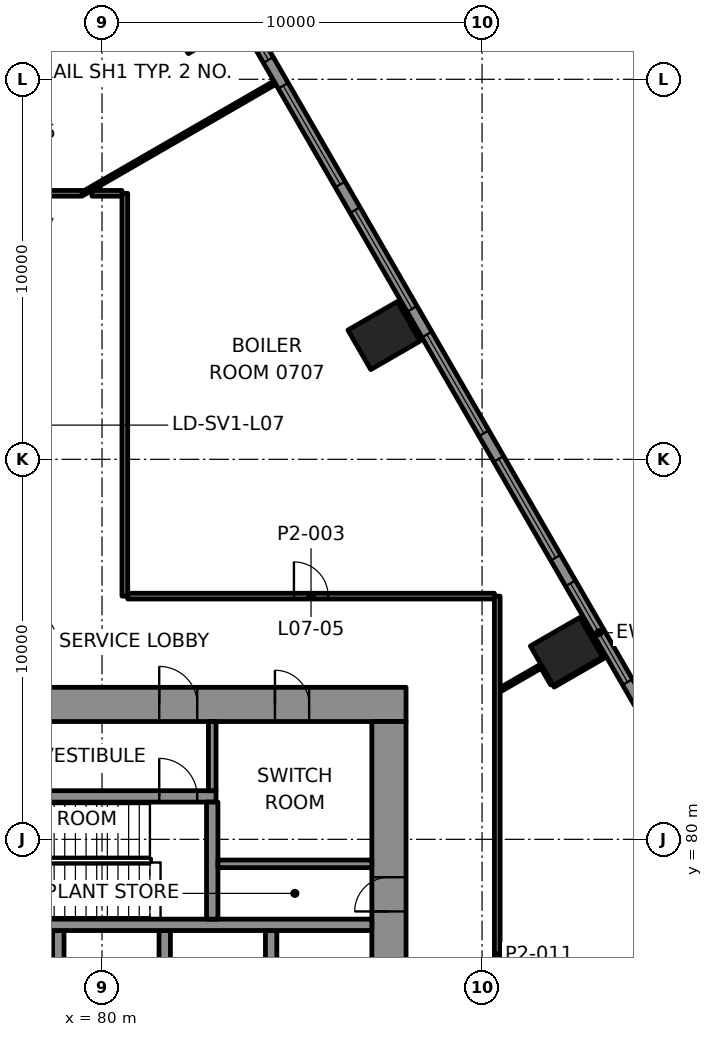
"""IFC4 building model, lengths in metres.
Left out: names, types, materials, properties, quantities, classifications, styles, units other than length and angle.
Written with IfcOpenShell. Run it as: python <this file> out.ifc"""

import sys

from ifc_helpers import new_model, si_unit, direction, frame, frame_2d, origin, origin_2d, place, context, subcontext, project, spatial, rectangle, extrude, element, fill, save


model = new_model("IFC4")
c1 = context("Model", 3, precision=1e-05, world=origin(), true_north=direction((0.0, 1.0)))
c2 = subcontext(c1, "Body", "Model", "MODEL_VIEW")
j1 = project(units=[si_unit("LENGTHUNIT", "METRE"), si_unit("PLANEANGLEUNIT", "RADIAN")], contexts=[c1])
p1 = place(None, origin())
s1 = spatial("IfcSite", under=j1, at=p1, CompositionType="ELEMENT")
p2 = place(p1, origin())
s2 = spatial("IfcBuilding", under=s1, at=p2, CompositionType="ELEMENT")
p3 = place(p2, frame((0.0, 0.0, 35.5)))
s3 = spatial("IfcBuildingStorey", under=s2, at=p3, CompositionType="ELEMENT", Elevation=35.5)
for number, where, z_axis, x_axis in (
    (1, (92.22, 84.942, -0.0), (0.0, 0.0, 1.0), (-0.5, 0.866, 0.0)),
    (2, (87.421, 93.256, -0.0), (0.0, 0.0, 1.0), (-0.5, 0.866, 0.0)),
    (3, (82.621, 101.57, -0.0), (0.0, 0.0, 1.0), (-0.5, 0.866, 0.0)),
):
    element("IfcColumn", number, at=place(p3, frame(where, z_axis=z_axis, x_axis=x_axis)), inside=s3, PredefinedType="COLUMN", context=c2, shape_type="SweptSolid", body=[
        extrude(rectangle(XDim=1.2, YDim=1.5, at=origin_2d()), origin(), (0.0, 0.0, 1.0), 4.5),
    ])
p4 = place(p3, frame((62.0, 83.55, 0.0), z_axis=(0.0, 0.0, 1.0), x_axis=(1.0, 0.0, 0.0)))
e4 = element("IfcWall", 4, at=p4, inside=s3, PredefinedType="SHEAR", context=c2, shape_type="SweptSolid", body=[
    extrude(rectangle(XDim=26.0, YDim=0.9, at=frame_2d((13.0, 0.0))), origin(), (0.0, 0.0, 1.0), 4.3),
])
p5 = place(p4, frame((5.695, 0.0, 0.0)))
e5 = element("IfcOpeningElement", 5, at=p5, cuts=e4, PredefinedType="OPENING", context=c2, shape_type="SweptSolid", body=[
    extrude(rectangle(XDim=1.0, YDim=2.1, at=frame_2d((0.5, 1.05))), frame((0.0, 0.46, 0.0), z_axis=(0.0, -1.0, 0.0), x_axis=(1.0, 0.0, 0.0)), (0.0, 0.0, 1.0), 0.92),
])
p6 = place(p4, frame((19.505, 0.0, 0.0)))
e6 = element("IfcOpeningElement", 6, at=p6, cuts=e4, PredefinedType="OPENING", context=c2, shape_type="SweptSolid", body=[
    extrude(rectangle(XDim=1.0, YDim=2.1, at=frame_2d((0.5, 1.05))), frame((0.0, 0.46, 0.0), z_axis=(0.0, -1.0, 0.0), x_axis=(1.0, 0.0, 0.0)), (0.0, 0.0, 1.0), 0.92),
])
p7 = place(p4, frame((3.45, 0.0, 0.0)))
e7 = element("IfcOpeningElement", 7, at=p7, cuts=e4, PredefinedType="OPENING", context=c2, shape_type="SweptSolid", body=[
    extrude(rectangle(XDim=0.9, YDim=2.1, at=frame_2d((0.45, 1.05))), frame((0.0, 0.46, 0.0), z_axis=(0.0, -1.0, 0.0), x_axis=(1.0, 0.0, 0.0)), (0.0, 0.0, 1.0), 0.92),
])
p8 = place(p4, frame((12.65, 0.0, 0.0)))
e8 = element("IfcOpeningElement", 8, at=p8, cuts=e4, PredefinedType="OPENING", context=c2, shape_type="SweptSolid", body=[
    extrude(rectangle(XDim=0.9, YDim=2.1, at=frame_2d((0.45, 1.05))), frame((0.0, 0.46, 0.0), z_axis=(0.0, -1.0, 0.0), x_axis=(1.0, 0.0, 0.0)), (0.0, 0.0, 1.0), 0.92),
])
p9 = place(p4, frame((22.55, 0.0, 0.0)))
e9 = element("IfcOpeningElement", 9, at=p9, cuts=e4, PredefinedType="OPENING", context=c2, shape_type="SweptSolid", body=[
    extrude(rectangle(XDim=0.9, YDim=2.1, at=frame_2d((0.45, 1.05))), frame((0.0, 0.46, 0.0), z_axis=(0.0, -1.0, 0.0), x_axis=(1.0, 0.0, 0.0)), (0.0, 0.0, 1.0), 0.92),
])
p10 = place(p3, frame((87.55, 66.9, 0.0), z_axis=(0.0, 0.0, 1.0), x_axis=(0.0, 1.0, 0.0)))
e10 = element("IfcWall", 10, at=p10, inside=s3, PredefinedType="SHEAR", context=c2, shape_type="SweptSolid", body=[
    extrude(rectangle(XDim=16.2, YDim=0.9, at=frame_2d((8.1, 0.0))), origin(), (0.0, 0.0, 1.0), 4.3),
])
p11 = place(p10, frame((5.5, 0.0, 0.0)))
e11 = element("IfcOpeningElement", 11, at=p11, cuts=e10, PredefinedType="OPENING", context=c2, shape_type="SweptSolid", body=[
    extrude(rectangle(XDim=1.8, YDim=2.1, at=frame_2d((0.9, 1.05))), frame((0.0, 0.46, 0.0), z_axis=(0.0, -1.0, 0.0), x_axis=(1.0, 0.0, 0.0)), (0.0, 0.0, 1.0), 0.92),
])
p12 = place(p10, frame((11.202, 0.0, 0.0)))
e12 = element("IfcOpeningElement", 12, at=p12, cuts=e10, PredefinedType="OPENING", context=c2, shape_type="SweptSolid", body=[
    extrude(rectangle(XDim=0.9, YDim=2.1, at=frame_2d((0.45, 1.05))), frame((0.0, 0.46, 0.0), z_axis=(0.0, -1.0, 0.0), x_axis=(1.0, 0.0, 0.0)), (0.0, 0.0, 1.0), 0.92),
])
for number, where, z_axis, x_axis in (
    (13, (78.85, 75.0, 0.0), (0.0, 0.0, 1.0), (0.0, 1.0, 0.0)),
    (14, (81.65, 75.0, 0.0), (0.0, 0.0, 1.0), (0.0, 1.0, 0.0)),
    (15, (84.45, 75.0, 0.0), (0.0, 0.0, 1.0), (0.0, 1.0, 0.0)),
):
    element("IfcWall", number, at=place(p3, frame(where, z_axis=z_axis, x_axis=x_axis)), inside=s3, PredefinedType="SHEAR", context=c2, shape_type="SweptSolid", body=[
        extrude(rectangle(XDim=2.6, YDim=0.3, at=frame_2d((1.3, 0.0))), origin(), (0.0, 0.0, 1.0), 4.3),
    ])
p13 = place(p3, frame((64.35, 77.75, 0.0), z_axis=(0.0, 0.0, 1.0), x_axis=(1.0, 0.0, 0.0)))
e16 = element("IfcWall", 16, at=p13, inside=s3, PredefinedType="SHEAR", context=c2, shape_type="SweptSolid", body=[
    extrude(rectangle(XDim=22.75, YDim=0.3, at=frame_2d((11.375, 0.0))), origin(), (0.0, 0.0, 1.0), 4.3),
])
p14 = place(p13, frame((3.345, 0.0, 0.0)))
e17 = element("IfcOpeningElement", 17, at=p14, cuts=e16, PredefinedType="OPENING", context=c2, shape_type="SweptSolid", body=[
    extrude(rectangle(XDim=1.0, YDim=2.1, at=frame_2d((0.5, 1.05))), frame((0.0, 0.16, 0.0), z_axis=(0.0, -1.0, 0.0), x_axis=(1.0, 0.0, 0.0)), (0.0, 0.0, 1.0), 0.32),
])
p15 = place(p3, frame((76.14, 81.13, 0.0), z_axis=(0.0, 0.0, 1.0), x_axis=(1.0, 0.0, 0.0)))
e18 = element("IfcWall", 18, at=p15, inside=s3, PredefinedType="SHEAR", context=c2, shape_type="SweptSolid", body=[
    extrude(rectangle(XDim=6.86, YDim=0.3, at=frame_2d((3.43, 0.0))), origin(), (0.0, 0.0, 1.0), 4.3),
])
p16 = place(p15, frame((5.365, 0.0, 0.0)))
e19 = element("IfcOpeningElement", 19, at=p16, cuts=e18, PredefinedType="OPENING", context=c2, shape_type="SweptSolid", body=[
    extrude(rectangle(XDim=1.0, YDim=2.1, at=frame_2d((0.5, 1.05))), frame((0.0, 0.16, 0.0), z_axis=(0.0, -1.0, 0.0), x_axis=(1.0, 0.0, 0.0)), (0.0, 0.0, 1.0), 0.32),
])
p17 = place(p3, frame((82.9, 77.9, 0.0), z_axis=(0.0, 0.0, 1.0), x_axis=(0.0, 1.0, 0.0)))
e20 = element("IfcWall", 20, at=p17, inside=s3, PredefinedType="SHEAR", context=c2, shape_type="SweptSolid", body=[
    extrude(rectangle(XDim=3.08, YDim=0.3, at=frame_2d((1.54, 0.0))), origin(), (0.0, 0.0, 1.0), 4.3),
])
p18 = place(p3, frame((80.675, 86.4, 0.0), z_axis=(0.0, 0.0, 1.0), x_axis=(1.0, 0.0, 0.0)))
e21 = element("IfcWall", 21, at=p18, inside=s3, PredefinedType="PARTITIONING", context=c2, shape_type="SweptSolid", body=[
    extrude(rectangle(XDim=9.649, YDim=0.15, at=frame_2d((4.825, 0.0))), origin(), (0.0, 0.0, 1.0), 3.7),
])
p19 = place(p18, frame((4.375, 0.0, 0.0)))
e22 = element("IfcOpeningElement", 22, at=p19, cuts=e21, PredefinedType="OPENING", context=c2, shape_type="SweptSolid", body=[
    extrude(rectangle(XDim=0.9, YDim=2.1, at=frame_2d((0.45, 1.05))), frame((0.0, 0.085, 0.0), z_axis=(0.0, -1.0, 0.0), x_axis=(1.0, 0.0, 0.0)), (0.0, 0.0, 1.0), 0.17),
])
p20 = place(p3, frame((76.275, 97.0, 0.0), z_axis=(0.0, 0.0, 1.0), x_axis=(1.0, 0.0, 0.0)))
e23 = element("IfcWall", 23, at=p20, inside=s3, PredefinedType="PARTITIONING", context=c2, shape_type="SweptSolid", body=[
    extrude(rectangle(XDim=3.205, YDim=0.15, at=frame_2d((1.603, 0.0))), origin(), (0.0, 0.0, 1.0), 3.7),
])
p21 = place(p20, frame((1.153, 0.0, 0.0)))
e24 = element("IfcOpeningElement", 24, at=p21, cuts=e23, PredefinedType="OPENING", context=c2, shape_type="SweptSolid", body=[
    extrude(rectangle(XDim=0.9, YDim=2.1, at=frame_2d((0.45, 1.05))), frame((0.0, 0.085, 0.0), z_axis=(0.0, -1.0, 0.0), x_axis=(1.0, 0.0, 0.0)), (0.0, 0.0, 1.0), 0.17),
])
p22 = place(p3, frame((91.871, 84.048, 0.0), z_axis=(0.0, 0.0, 1.0), x_axis=(0.866026058841, 0.499998865407, 0.0)))
e25 = element("IfcWall", 25, at=p22, inside=s3, PredefinedType="PARTITIONING", context=c2, shape_type="SweptSolid", body=[
    extrude(rectangle(XDim=1.708, YDim=0.1, at=frame_2d((0.854, 0.0))), origin(), (0.0, 0.0, 1.0), 3.465),
])
p23 = place(p3, frame((90.501, 83.95, 0.0), z_axis=(0.0, 0.0, 1.0), x_axis=(0.866057204957, 0.499944914708, 0.0)))
e26 = element("IfcWall", 26, at=p23, inside=s3, PredefinedType="PARTITIONING", context=c2, shape_type="SweptSolid", body=[
    extrude(rectangle(XDim=1.235, YDim=0.1, at=frame_2d((0.618, 0.0))), origin(), (0.0, 0.0, 1.0), 3.7),
])
p24 = place(p3, frame((79.505, 97.0, 0.0), z_axis=(0.0, 0.0, 1.0), x_axis=(0.866009767966, 0.500027081053, 0.0)))
e27 = element("IfcWall", 27, at=p24, inside=s3, PredefinedType="PARTITIONING", context=c2, shape_type="SweptSolid", body=[
    extrude(rectangle(XDim=5.943, YDim=0.1, at=frame_2d((2.972, 0.0))), origin(), (0.0, 0.0, 1.0), 3.465),
])
p25 = place(p3, frame((90.4, 86.399, 0.0), z_axis=(0.0, 0.0, 1.0), x_axis=(0.0, -1.0, 0.0)))
e28 = element("IfcWall", 28, at=p25, inside=s3, PredefinedType="PARTITIONING", context=c2, shape_type="SweptSolid", body=[
    extrude(rectangle(XDim=18.905, YDim=0.15, at=frame_2d((9.453, 0.0))), origin(), (0.0, 0.0, 1.0), 3.7),
])
p26 = place(p25, frame((10.005, 0.0, 0.0)))
e29 = element("IfcOpeningElement", 29, at=p26, cuts=e28, PredefinedType="OPENING", context=c2, shape_type="SweptSolid", body=[
    extrude(rectangle(XDim=1.2, YDim=2.1, at=frame_2d((0.6, 1.05))), frame((0.0, 0.085, 0.0), z_axis=(0.0, -1.0, 0.0), x_axis=(1.0, 0.0, 0.0)), (0.0, 0.0, 1.0), 0.17),
])
p27 = place(p3, frame((80.6, 86.4, 0.0), z_axis=(0.0, 0.0, 1.0), x_axis=(0.0, 1.0, 0.0)))
e30 = element("IfcWall", 30, at=p27, inside=s3, PredefinedType="PARTITIONING", context=c2, shape_type="SweptSolid", body=[
    extrude(rectangle(XDim=10.6, YDim=0.15, at=frame_2d((5.3, 0.0))), origin(), (0.0, 0.0, 1.0), 3.7),
])
p28 = place(p3, frame((91.846, 84.092, 0.0), z_axis=(0.0, 0.0, 1.0), x_axis=(-0.500244977835, 0.865883919559, 0.0)))
e31 = element("IfcWall", 31, at=p28, inside=s3, PredefinedType="PARTITIONING", context=c2, shape_type="SweptSolid", body=[
    extrude(rectangle(XDim=0.499, YDim=0.1, at=frame_2d((0.25, 0.0))), origin(), (0.0, 0.0, 1.0), 3.7),
])
p29 = place(p3, frame((79.735, 97.0, 0.0), z_axis=(0.0, 0.0, 1.0), x_axis=(1.0, 0.0, 0.0)))
e32 = element("IfcWall", 32, at=p29, inside=s3, PredefinedType="PARTITIONING", context=c2, shape_type="SweptSolid", body=[
    extrude(rectangle(XDim=0.79, YDim=0.15, at=frame_2d((0.395, 0.0))), origin(), (0.0, 0.0, 1.0), 3.7),
])
p30 = place(p3, frame((107.504, 60.451, 0.0), z_axis=(0.0, 0.0, 1.0), x_axis=(-0.500000550228, 0.86602508611, 0.0)))
e33 = element("IfcWall", 33, at=p30, inside=s3, PredefinedType="SOLIDWALL", context=c2, shape_type="SweptSolid", body=[
    extrude(rectangle(XDim=57.704, YDim=0.3, at=frame_2d((28.852, 0.0))), origin(), (0.0, 0.0, 1.0), 4.3),
])
p31 = place(p30, frame((0.89, 0.0, 0.8)))
e34 = element("IfcOpeningElement", 34, at=p31, cuts=e33, PredefinedType="OPENING", context=c2, shape_type="SweptSolid", body=[
    extrude(rectangle(XDim=3.0, YDim=2.4, at=frame_2d((1.5, 1.2))), frame((0.0, 0.16, 0.0), z_axis=(0.0, -1.0, 0.0), x_axis=(1.0, 0.0, 0.0)), (0.0, 0.0, 1.0), 0.32),
])
p32 = place(p30, frame((4.67, 0.0, 0.8)))
e35 = element("IfcOpeningElement", 35, at=p32, cuts=e33, PredefinedType="OPENING", context=c2, shape_type="SweptSolid", body=[
    extrude(rectangle(XDim=3.0, YDim=2.4, at=frame_2d((1.5, 1.2))), frame((0.0, 0.16, 0.0), z_axis=(0.0, -1.0, 0.0), x_axis=(1.0, 0.0, 0.0)), (0.0, 0.0, 1.0), 0.32),
])
p33 = place(p30, frame((8.451, 0.0, 0.8)))
e36 = element("IfcOpeningElement", 36, at=p33, cuts=e33, PredefinedType="OPENING", context=c2, shape_type="SweptSolid", body=[
    extrude(rectangle(XDim=3.0, YDim=2.4, at=frame_2d((1.5, 1.2))), frame((0.0, 0.16, 0.0), z_axis=(0.0, -1.0, 0.0), x_axis=(1.0, 0.0, 0.0)), (0.0, 0.0, 1.0), 0.32),
])
p34 = place(p30, frame((12.231, 0.0, 0.8)))
e37 = element("IfcOpeningElement", 37, at=p34, cuts=e33, PredefinedType="OPENING", context=c2, shape_type="SweptSolid", body=[
    extrude(rectangle(XDim=3.0, YDim=2.4, at=frame_2d((1.5, 1.2))), frame((0.0, 0.16, 0.0), z_axis=(0.0, -1.0, 0.0), x_axis=(1.0, 0.0, 0.0)), (0.0, 0.0, 1.0), 0.32),
])
p35 = place(p30, frame((16.011, 0.0, 0.8)))
e38 = element("IfcOpeningElement", 38, at=p35, cuts=e33, PredefinedType="OPENING", context=c2, shape_type="SweptSolid", body=[
    extrude(rectangle(XDim=3.0, YDim=2.4, at=frame_2d((1.5, 1.2))), frame((0.0, 0.16, 0.0), z_axis=(0.0, -1.0, 0.0), x_axis=(1.0, 0.0, 0.0)), (0.0, 0.0, 1.0), 0.32),
])
p36 = place(p30, frame((19.792, 0.0, 0.8)))
e39 = element("IfcOpeningElement", 39, at=p36, cuts=e33, PredefinedType="OPENING", context=c2, shape_type="SweptSolid", body=[
    extrude(rectangle(XDim=3.0, YDim=2.4, at=frame_2d((1.5, 1.2))), frame((0.0, 0.16, 0.0), z_axis=(0.0, -1.0, 0.0), x_axis=(1.0, 0.0, 0.0)), (0.0, 0.0, 1.0), 0.32),
])
p37 = place(p30, frame((23.572, 0.0, 0.8)))
e40 = element("IfcOpeningElement", 40, at=p37, cuts=e33, PredefinedType="OPENING", context=c2, shape_type="SweptSolid", body=[
    extrude(rectangle(XDim=3.0, YDim=2.4, at=frame_2d((1.5, 1.2))), frame((0.0, 0.16, 0.0), z_axis=(0.0, -1.0, 0.0), x_axis=(1.0, 0.0, 0.0)), (0.0, 0.0, 1.0), 0.32),
])
p38 = place(p30, frame((27.352, 0.0, 0.8)))
e41 = element("IfcOpeningElement", 41, at=p38, cuts=e33, PredefinedType="OPENING", context=c2, shape_type="SweptSolid", body=[
    extrude(rectangle(XDim=3.0, YDim=2.4, at=frame_2d((1.5, 1.2))), frame((0.0, 0.16, 0.0), z_axis=(0.0, -1.0, 0.0), x_axis=(1.0, 0.0, 0.0)), (0.0, 0.0, 1.0), 0.32),
])
p39 = place(p30, frame((31.132, 0.0, 0.8)))
e42 = element("IfcOpeningElement", 42, at=p39, cuts=e33, PredefinedType="OPENING", context=c2, shape_type="SweptSolid", body=[
    extrude(rectangle(XDim=3.0, YDim=2.4, at=frame_2d((1.5, 1.2))), frame((0.0, 0.16, 0.0), z_axis=(0.0, -1.0, 0.0), x_axis=(1.0, 0.0, 0.0)), (0.0, 0.0, 1.0), 0.32),
])
p40 = place(p30, frame((34.913, 0.0, 0.8)))
e43 = element("IfcOpeningElement", 43, at=p40, cuts=e33, PredefinedType="OPENING", context=c2, shape_type="SweptSolid", body=[
    extrude(rectangle(XDim=3.0, YDim=2.4, at=frame_2d((1.5, 1.2))), frame((0.0, 0.16, 0.0), z_axis=(0.0, -1.0, 0.0), x_axis=(1.0, 0.0, 0.0)), (0.0, 0.0, 1.0), 0.32),
])
p41 = place(p30, frame((38.693, 0.0, 0.8)))
e44 = element("IfcOpeningElement", 44, at=p41, cuts=e33, PredefinedType="OPENING", context=c2, shape_type="SweptSolid", body=[
    extrude(rectangle(XDim=3.0, YDim=2.4, at=frame_2d((1.5, 1.2))), frame((0.0, 0.16, 0.0), z_axis=(0.0, -1.0, 0.0), x_axis=(1.0, 0.0, 0.0)), (0.0, 0.0, 1.0), 0.32),
])
p42 = place(p30, frame((42.473, 0.0, 0.8)))
e45 = element("IfcOpeningElement", 45, at=p42, cuts=e33, PredefinedType="OPENING", context=c2, shape_type="SweptSolid", body=[
    extrude(rectangle(XDim=3.0, YDim=2.4, at=frame_2d((1.5, 1.2))), frame((0.0, 0.16, 0.0), z_axis=(0.0, -1.0, 0.0), x_axis=(1.0, 0.0, 0.0)), (0.0, 0.0, 1.0), 0.32),
])
p43 = place(p30, frame((46.253, 0.0, 0.8)))
e46 = element("IfcOpeningElement", 46, at=p43, cuts=e33, PredefinedType="OPENING", context=c2, shape_type="SweptSolid", body=[
    extrude(rectangle(XDim=3.0, YDim=2.4, at=frame_2d((1.5, 1.2))), frame((0.0, 0.16, 0.0), z_axis=(0.0, -1.0, 0.0), x_axis=(1.0, 0.0, 0.0)), (0.0, 0.0, 1.0), 0.32),
])
p44 = place(p30, frame((50.033, 0.0, 0.8)))
e47 = element("IfcOpeningElement", 47, at=p44, cuts=e33, PredefinedType="OPENING", context=c2, shape_type="SweptSolid", body=[
    extrude(rectangle(XDim=3.0, YDim=2.4, at=frame_2d((1.5, 1.2))), frame((0.0, 0.16, 0.0), z_axis=(0.0, -1.0, 0.0), x_axis=(1.0, 0.0, 0.0)), (0.0, 0.0, 1.0), 0.32),
])
p45 = place(p30, frame((53.814, 0.0, 0.8)))
e48 = element("IfcOpeningElement", 48, at=p45, cuts=e33, PredefinedType="OPENING", context=c2, shape_type="SweptSolid", body=[
    extrude(rectangle(XDim=3.0, YDim=2.4, at=frame_2d((1.5, 1.2))), frame((0.0, 0.16, 0.0), z_axis=(0.0, -1.0, 0.0), x_axis=(1.0, 0.0, 0.0)), (0.0, 0.0, 1.0), 0.32),
])
p46 = place(p3, frame((83.05, 79.355, 0.0), z_axis=(0.0, 0.0, 1.0), x_axis=(1.0, 0.0, 0.0)))
e49 = element("IfcWall", 49, at=p46, inside=s3, PredefinedType="PARTITIONING", context=c2, shape_type="SweptSolid", body=[
    extrude(rectangle(XDim=4.05, YDim=0.2, at=frame_2d((2.025, 0.0))), origin(), (0.0, 0.0, 1.0), 4.3),
])
p47 = place(p3, frame((82.9, 81.28, 0.0), z_axis=(0.0, 0.0, 1.0), x_axis=(0.0, 1.0, 0.0)))
e50 = element("IfcWall", 50, at=p47, inside=s3, PredefinedType="PARTITIONING", context=c2, shape_type="SweptSolid", body=[
    extrude(rectangle(XDim=1.82, YDim=0.2, at=frame_2d((0.91, 0.0))), origin(), (0.0, 0.0, 1.0), 4.3),
])
p48 = place(p19, origin())
e51 = element("IfcDoor", 51, at=p48, inside=s3, OperationType="SINGLE_SWING_RIGHT", PredefinedType="DOOR", context=c2, shape_type="SweptSolid", body=[
    extrude(rectangle(XDim=0.9, YDim=2.1, at=frame_2d((0.45, 1.05))), frame((0.0, 0.025, 0.0), z_axis=(0.0, -1.0, 0.0), x_axis=(1.0, 0.0, 0.0)), (0.0, 0.0, 1.0), 0.05),
])
fill(e22, e51)
p49 = place(p38, origin())
e52 = element("IfcWindow", 52, at=p49, inside=s3, PartitioningType="SINGLE_PANEL", PredefinedType="WINDOW", context=c2, shape_type="SweptSolid", body=[
    extrude(rectangle(XDim=3.0, YDim=2.4, at=frame_2d((1.5, 1.2))), frame((0.0, 0.03, 0.0), z_axis=(0.0, -1.0, 0.0), x_axis=(1.0, 0.0, 0.0)), (0.0, 0.0, 1.0), 0.06),
])
fill(e41, e52)
p50 = place(p39, origin())
e53 = element("IfcWindow", 53, at=p50, inside=s3, PartitioningType="SINGLE_PANEL", PredefinedType="WINDOW", context=c2, shape_type="SweptSolid", body=[
    extrude(rectangle(XDim=3.0, YDim=2.4, at=frame_2d((1.5, 1.2))), frame((0.0, 0.03, 0.0), z_axis=(0.0, -1.0, 0.0), x_axis=(1.0, 0.0, 0.0)), (0.0, 0.0, 1.0), 0.06),
])
fill(e42, e53)
p51 = place(p40, origin())
e54 = element("IfcWindow", 54, at=p51, inside=s3, PartitioningType="SINGLE_PANEL", PredefinedType="WINDOW", context=c2, shape_type="SweptSolid", body=[
    extrude(rectangle(XDim=3.0, YDim=2.4, at=frame_2d((1.5, 1.2))), frame((0.0, 0.03, 0.0), z_axis=(0.0, -1.0, 0.0), x_axis=(1.0, 0.0, 0.0)), (0.0, 0.0, 1.0), 0.06),
])
fill(e43, e54)
p52 = place(p41, origin())
e55 = element("IfcWindow", 55, at=p52, inside=s3, PartitioningType="SINGLE_PANEL", PredefinedType="WINDOW", context=c2, shape_type="SweptSolid", body=[
    extrude(rectangle(XDim=3.0, YDim=2.4, at=frame_2d((1.5, 1.2))), frame((0.0, 0.03, 0.0), z_axis=(0.0, -1.0, 0.0), x_axis=(1.0, 0.0, 0.0)), (0.0, 0.0, 1.0), 0.06),
])
fill(e44, e55)
p53 = place(p42, origin())
e56 = element("IfcWindow", 56, at=p53, inside=s3, PartitioningType="SINGLE_PANEL", PredefinedType="WINDOW", context=c2, shape_type="SweptSolid", body=[
    extrude(rectangle(XDim=3.0, YDim=2.4, at=frame_2d((1.5, 1.2))), frame((0.0, 0.03, 0.0), z_axis=(0.0, -1.0, 0.0), x_axis=(1.0, 0.0, 0.0)), (0.0, 0.0, 1.0), 0.06),
])
fill(e45, e56)
p54 = place(p43, origin())
e57 = element("IfcWindow", 57, at=p54, inside=s3, PartitioningType="SINGLE_PANEL", PredefinedType="WINDOW", context=c2, shape_type="SweptSolid", body=[
    extrude(rectangle(XDim=3.0, YDim=2.4, at=frame_2d((1.5, 1.2))), frame((0.0, 0.03, 0.0), z_axis=(0.0, -1.0, 0.0), x_axis=(1.0, 0.0, 0.0)), (0.0, 0.0, 1.0), 0.06),
])
fill(e46, e57)
p55 = place(p16, origin())
e58 = element("IfcDoor", 58, at=p55, inside=s3, OperationType="SINGLE_SWING_RIGHT", PredefinedType="DOOR", context=c2, shape_type="SweptSolid", body=[
    extrude(rectangle(XDim=1.0, YDim=2.1, at=frame_2d((0.5, 1.05))), frame((0.0, 0.025, 0.0), z_axis=(0.0, -1.0, 0.0), x_axis=(1.0, 0.0, 0.0)), (0.0, 0.0, 1.0), 0.05),
])
fill(e19, e58)
p56 = place(p6, origin())
e59 = element("IfcDoor", 59, at=p56, inside=s3, OperationType="SINGLE_SWING_LEFT", PredefinedType="DOOR", context=c2, shape_type="SweptSolid", body=[
    extrude(rectangle(XDim=1.0, YDim=2.1, at=frame_2d((0.5, 1.05))), frame((0.0, 0.17, 0.0), z_axis=(0.0, -1.0, 0.0), x_axis=(1.0, 0.0, 0.0)), (0.0, 0.0, 1.0), 0.34),
])
fill(e6, e59)
p57 = place(p12, origin())
e60 = element("IfcDoor", 60, at=p57, inside=s3, OperationType="SINGLE_SWING_RIGHT", PredefinedType="DOOR", context=c2, shape_type="SweptSolid", body=[
    extrude(rectangle(XDim=0.9, YDim=2.1, at=frame_2d((0.45, 1.05))), frame((0.0, 0.17, 0.0), z_axis=(0.0, -1.0, 0.0), x_axis=(1.0, 0.0, 0.0)), (0.0, 0.0, 1.0), 0.34),
])
fill(e12, e60)
p58 = place(p9, origin())
e61 = element("IfcDoor", 61, at=p58, inside=s3, OperationType="SINGLE_SWING_LEFT", PredefinedType="DOOR", context=c2, shape_type="SweptSolid", body=[
    extrude(rectangle(XDim=0.9, YDim=2.1, at=frame_2d((0.45, 1.05))), frame((0.0, 0.17, 0.0), z_axis=(0.0, -1.0, 0.0), x_axis=(1.0, 0.0, 0.0)), (0.0, 0.0, 1.0), 0.34),
])
fill(e9, e61)
save(model, sys.argv[1])
